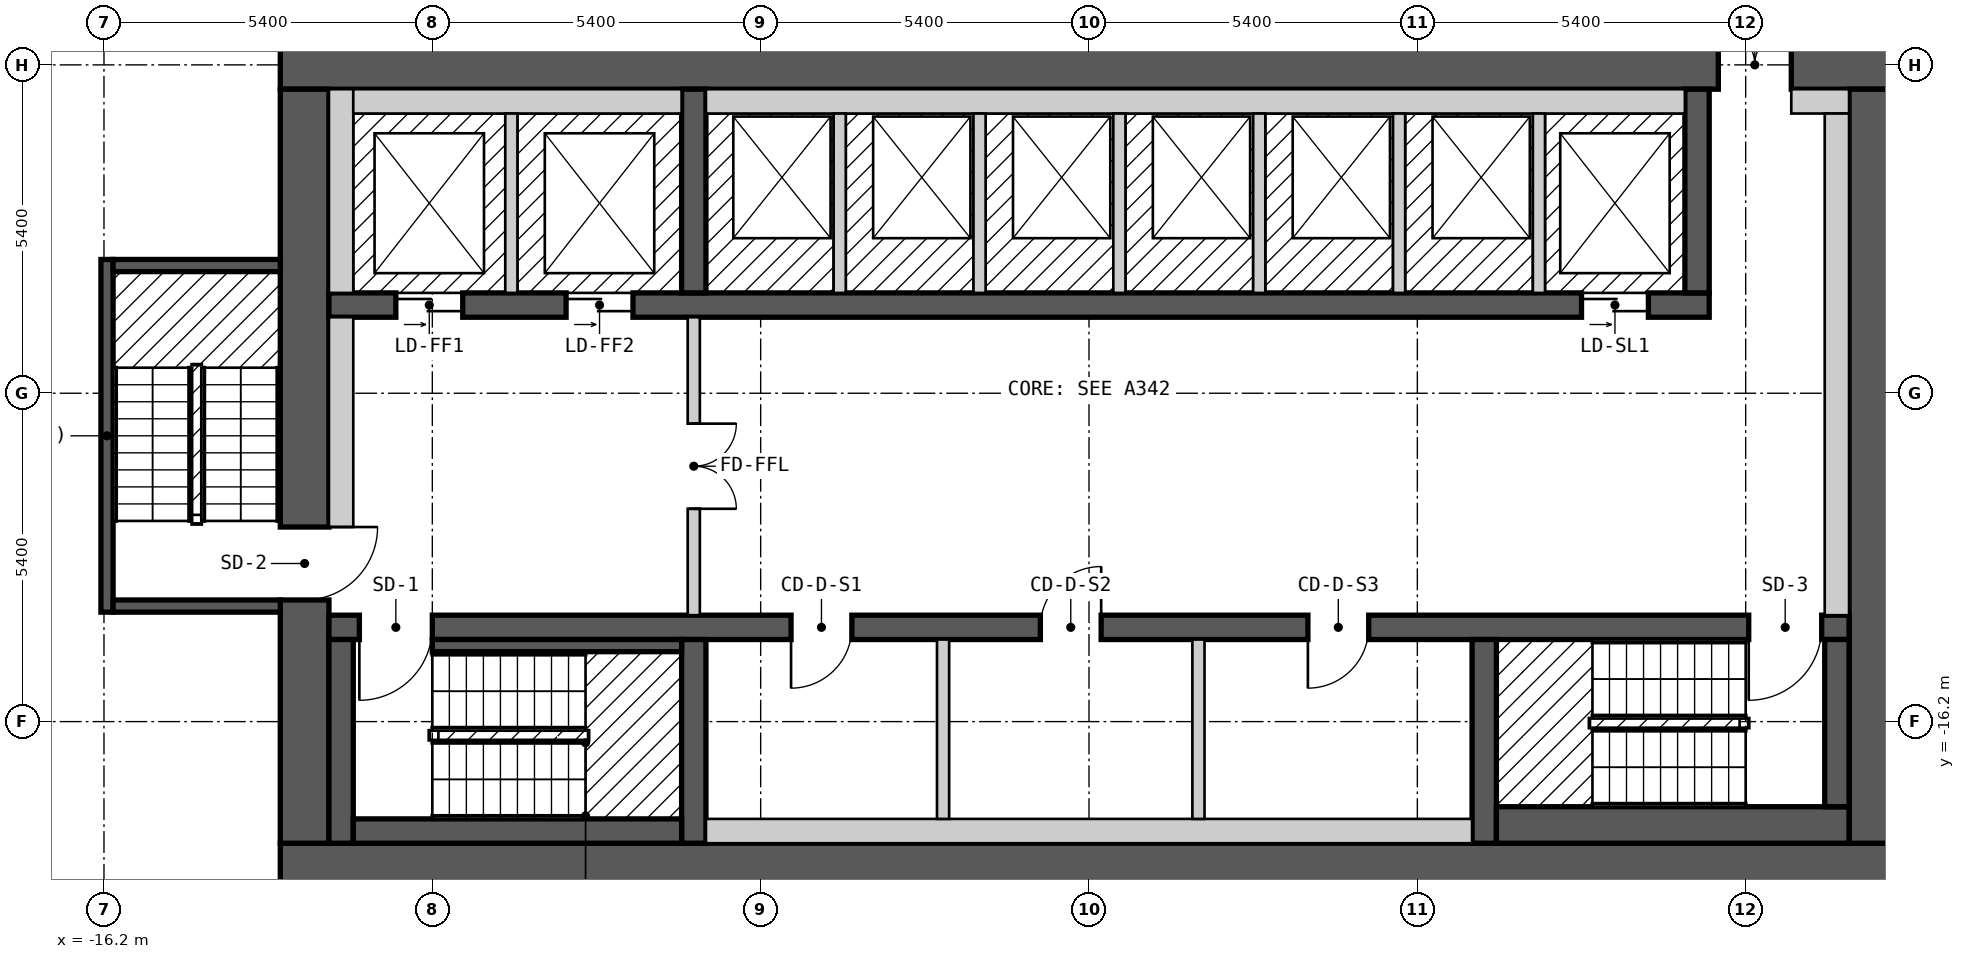
"""IFC4 building model, lengths in metres.
Left out: names, types, materials, properties, quantities, classifications, styles, units other than length and angle.
Written with IfcOpenShell. Run it as: python <this file> out.ifc"""

import sys

from ifc_helpers import new_model, si_unit, direction, frame, frame_2d, origin, place, context, subcontext, project, spatial, polyline, rectangle, outline, extrude, element, fill, save


model = new_model("IFC4")
c1 = context("Model", 3, precision=1e-05, world=origin(), true_north=direction((0.0, 1.0)))
c2 = subcontext(c1, "Body", "Model", "MODEL_VIEW")
j1 = project(units=[si_unit("LENGTHUNIT", "METRE"), si_unit("PLANEANGLEUNIT", "RADIAN")], contexts=[c1])
p1 = place(None, origin())
s1 = spatial("IfcSite", under=j1, at=p1, CompositionType="ELEMENT")
p2 = place(p1, origin())
s2 = spatial("IfcBuilding", under=s1, at=p2, CompositionType="ELEMENT")
p3 = place(p2, frame((0.0, 0.0, 153.6)))
s3 = spatial("IfcBuildingStorey", under=s2, at=p3, CompositionType="ELEMENT", Elevation=153.6)
p4 = place(p3, frame((-13.3, -18.6, 0.0), z_axis=(0.0, 0.0, 1.0), x_axis=(1.0, 0.0, 0.0)))
e1 = element("IfcWall", 1, at=p4, inside=s3, PredefinedType="SHEAR", context=c2, shape_type="SweptSolid", body=[
    extrude(rectangle(XDim=26.6, YDim=0.8, at=frame_2d((13.3, 0.0))), origin(), (0.0, 0.0, 1.0), 2.6),
])
p5 = place(p3, frame((-13.3, -5.4, 0.0), z_axis=(0.0, 0.0, 1.0), x_axis=(1.0, 0.0, 0.0)))
e2 = element("IfcWall", 2, at=p5, inside=s3, PredefinedType="SHEAR", context=c2, shape_type="SweptSolid", body=[
    extrude(rectangle(XDim=26.6, YDim=0.8, at=frame_2d((13.3, 0.0))), origin(), (0.0, 0.0, 1.0), 2.6),
])
p6 = place(p5, frame((23.65, 0.0, 0.0)))
e3 = element("IfcOpeningElement", 3, at=p6, cuts=e2, PredefinedType="OPENING", context=c2, shape_type="SweptSolid", body=[
    extrude(rectangle(XDim=1.2, YDim=2.1, at=frame_2d((0.6, 1.05))), frame((0.0, 0.41, 0.0), z_axis=(0.0, -1.0, 0.0), x_axis=(1.0, 0.0, 0.0)), (0.0, 0.0, 1.0), 0.82),
])
p7 = place(p3, frame((-12.9, -18.2, 0.0), z_axis=(0.0, 0.0, 1.0), x_axis=(0.0, 1.0, 0.0)))
e4 = element("IfcWall", 4, at=p7, inside=s3, PredefinedType="SHEAR", context=c2, shape_type="SweptSolid", body=[
    extrude(rectangle(XDim=12.4, YDim=0.8, at=frame_2d((6.2, 0.0))), origin(), (0.0, 0.0, 1.0), 2.6),
])
p8 = place(p7, frame((4.0, 0.0, 0.0)))
e5 = element("IfcOpeningElement", 5, at=p8, cuts=e4, PredefinedType="OPENING", context=c2, shape_type="SweptSolid", body=[
    extrude(rectangle(XDim=1.2, YDim=2.1, at=frame_2d((0.6, 1.05))), frame((0.0, 0.41, 0.0), z_axis=(0.0, -1.0, 0.0), x_axis=(1.0, 0.0, 0.0)), (0.0, 0.0, 1.0), 0.82),
])
p9 = place(p3, frame((12.9, -18.2, 0.0), z_axis=(0.0, 0.0, 1.0), x_axis=(0.0, 1.0, 0.0)))
e6 = element("IfcWall", 6, at=p9, inside=s3, PredefinedType="SHEAR", context=c2, shape_type="SweptSolid", body=[
    extrude(rectangle(XDim=12.4, YDim=0.8, at=frame_2d((6.2, 0.0))), origin(), (0.0, 0.0, 1.0), 2.6),
])
p10 = place(p3, frame((-12.5, -14.65, 0.0), z_axis=(0.0, 0.0, 1.0), x_axis=(1.0, 0.0, 0.0)))
e7 = element("IfcWall", 7, at=p10, inside=s3, PredefinedType="SHEAR", context=c2, shape_type="SweptSolid", body=[
    extrude(rectangle(XDim=25.0, YDim=0.4, at=frame_2d((12.5, 0.0))), origin(), (0.0, 0.0, 1.0), 2.6),
])
p11 = place(p10, frame((1.7, 0.0, 0.0), z_axis=(0.0, 0.0, 1.0), x_axis=(-1.0, 0.0, 0.0)))
e8 = element("IfcOpeningElement", 8, at=p11, cuts=e7, PredefinedType="OPENING", context=c2, shape_type="SweptSolid", body=[
    extrude(rectangle(XDim=1.2, YDim=2.1, at=frame_2d((0.6, 1.05))), frame((0.0, 0.21, 0.0), z_axis=(0.0, -1.0, 0.0), x_axis=(1.0, 0.0, 0.0)), (0.0, 0.0, 1.0), 0.42),
])
p12 = place(p10, frame((24.55, 0.0, 0.0), z_axis=(0.0, 0.0, 1.0), x_axis=(-1.0, 0.0, 0.0)))
e9 = element("IfcOpeningElement", 9, at=p12, cuts=e7, PredefinedType="OPENING", context=c2, shape_type="SweptSolid", body=[
    extrude(rectangle(XDim=1.2, YDim=2.1, at=frame_2d((0.6, 1.05))), frame((0.0, 0.21, 0.0), z_axis=(0.0, -1.0, 0.0), x_axis=(1.0, 0.0, 0.0)), (0.0, 0.0, 1.0), 0.42),
])
p13 = place(p10, frame((8.6, 0.0, 0.0), z_axis=(0.0, 0.0, 1.0), x_axis=(-1.0, 0.0, 0.0)))
e10 = element("IfcOpeningElement", 10, at=p13, cuts=e7, PredefinedType="OPENING", context=c2, shape_type="SweptSolid", body=[
    extrude(rectangle(XDim=1.0, YDim=2.1, at=frame_2d((0.5, 1.05))), frame((0.0, 0.21, 0.0), z_axis=(0.0, -1.0, 0.0), x_axis=(1.0, 0.0, 0.0)), (0.0, 0.0, 1.0), 0.42),
])
p14 = place(p10, frame((12.7, 0.0, 0.0), z_axis=(0.0, 0.0, 1.0), x_axis=(-1.0, 0.0, 0.0)))
e11 = element("IfcOpeningElement", 11, at=p14, cuts=e7, PredefinedType="OPENING", context=c2, shape_type="SweptSolid", body=[
    extrude(rectangle(XDim=1.0, YDim=2.1, at=frame_2d((0.5, 1.05))), frame((0.0, 0.21, 0.0), z_axis=(0.0, -1.0, 0.0), x_axis=(1.0, 0.0, 0.0)), (0.0, 0.0, 1.0), 0.42),
])
p15 = place(p10, frame((17.1, 0.0, 0.0), z_axis=(0.0, 0.0, 1.0), x_axis=(-1.0, 0.0, 0.0)))
e12 = element("IfcOpeningElement", 12, at=p15, cuts=e7, PredefinedType="OPENING", context=c2, shape_type="SweptSolid", body=[
    extrude(rectangle(XDim=1.0, YDim=2.1, at=frame_2d((0.5, 1.05))), frame((0.0, 0.21, 0.0), z_axis=(0.0, -1.0, 0.0), x_axis=(1.0, 0.0, 0.0)), (0.0, 0.0, 1.0), 0.42),
])
p16 = place(p3, frame((-12.5, -9.35, 0.0), z_axis=(0.0, 0.0, 1.0), x_axis=(1.0, 0.0, 0.0)))
e13 = element("IfcWall", 13, at=p16, inside=s3, PredefinedType="SHEAR", context=c2, shape_type="SweptSolid", body=[
    extrude(rectangle(XDim=22.7, YDim=0.4, at=frame_2d((11.35, 0.0))), origin(), (0.0, 0.0, 1.0), 2.6),
])
p17 = place(p16, frame((1.1, 0.0, 0.0)))
e14 = element("IfcOpeningElement", 14, at=p17, cuts=e13, PredefinedType="OPENING", context=c2, shape_type="SweptSolid", body=[
    extrude(rectangle(XDim=1.1, YDim=2.1, at=frame_2d((0.55, 1.05))), frame((0.0, 0.21, 0.0), z_axis=(0.0, -1.0, 0.0), x_axis=(1.0, 0.0, 0.0)), (0.0, 0.0, 1.0), 0.42),
])
p18 = place(p16, frame((3.9, 0.0, 0.0)))
e15 = element("IfcOpeningElement", 15, at=p18, cuts=e13, PredefinedType="OPENING", context=c2, shape_type="SweptSolid", body=[
    extrude(rectangle(XDim=1.1, YDim=2.1, at=frame_2d((0.55, 1.05))), frame((0.0, 0.21, 0.0), z_axis=(0.0, -1.0, 0.0), x_axis=(1.0, 0.0, 0.0)), (0.0, 0.0, 1.0), 0.42),
])
p19 = place(p16, frame((20.6, 0.0, 0.0)))
e16 = element("IfcOpeningElement", 16, at=p19, cuts=e13, PredefinedType="OPENING", context=c2, shape_type="SweptSolid", body=[
    extrude(rectangle(XDim=1.1, YDim=2.1, at=frame_2d((0.55, 1.05))), frame((0.0, 0.21, 0.0), z_axis=(0.0, -1.0, 0.0), x_axis=(1.0, 0.0, 0.0)), (0.0, 0.0, 1.0), 0.42),
])
for number, where, z_axis, x_axis in (
    (17, (-6.5, -18.2, 0.0), (0.0, 0.0, 1.0), (0.0, 1.0, 0.0)),
    (18, (6.5, -18.2, 0.0), (0.0, 0.0, 1.0), (0.0, 1.0, 0.0)),
    (19, (-6.5, -9.15, 0.0), (0.0, 0.0, 1.0), (0.0, 1.0, 0.0)),
    (20, (10.0, -9.15, 0.0), (0.0, 0.0, 1.0), (0.0, 1.0, 0.0)),
):
    element("IfcWall", number, at=place(p3, frame(where, z_axis=z_axis, x_axis=x_axis)), inside=s3, PredefinedType="SHEAR", context=c2, shape_type="SweptSolid", body=[
        extrude(rectangle(XDim=3.35, YDim=0.4, at=frame_2d((1.675, 0.0))), origin(), (0.0, 0.0, 1.0), 2.6),
    ])
p20 = place(p3, frame((-28.218, -2.025, 0.0), z_axis=(0.0, 0.0, 1.0), x_axis=(0.500017503135, -0.866015298109, 0.0)))
e21 = element("IfcWall", 21, at=p20, inside=s3, PredefinedType="SOLIDWALL", context=c2, shape_type="SweptSolid", body=[
    extrude(outline(polyline([(0.0, -0.15), (24.711, -0.15), (24.631, 0.15), (0.08, 0.15), (0.0, -0.15)])), origin(), (0.0, 0.0, 1.0), 2.6),
])
p21 = place(p3, frame((-16.15, -14.4, 0.0), z_axis=(0.0, 0.0, 1.0), x_axis=(0.0, 1.0, 0.0)))
e22 = element("IfcWall", 22, at=p21, inside=s3, PredefinedType="SOLIDWALL", context=c2, shape_type="SweptSolid", body=[
    extrude(rectangle(XDim=5.8, YDim=0.2, at=frame_2d((2.9, 0.0))), origin(), (0.0, 0.0, 1.0), 2.6),
])
for number, where, z_axis, x_axis in (
    (23, (-16.05, -14.3, 0.0), (0.0, 0.0, 1.0), (1.0, 0.0, 0.0)),
    (24, (-16.05, -8.7, 0.0), (0.0, 0.0, 1.0), (1.0, 0.0, 0.0)),
):
    element("IfcWall", number, at=place(p3, frame(where, z_axis=z_axis, x_axis=x_axis)), inside=s3, PredefinedType="SOLIDWALL", context=c2, shape_type="SweptSolid", body=[
        extrude(rectangle(XDim=2.75, YDim=0.2, at=frame_2d((1.375, 0.0))), origin(), (0.0, 0.0, 1.0), 2.6),
    ])
p22 = place(p3, frame((-12.3, -18.2, 0.0), z_axis=(0.0, 0.0, 1.0), x_axis=(0.0, 1.0, 0.0)))
e25 = element("IfcWall", 25, at=p22, inside=s3, PredefinedType="SOLIDWALL", context=c2, shape_type="SweptSolid", body=[
    extrude(rectangle(XDim=3.35, YDim=0.4, at=frame_2d((1.675, 0.0))), origin(), (0.0, 0.0, 1.0), 2.6),
])
p23 = place(p3, frame((-12.3, -13.0, 0.0), z_axis=(0.0, 0.0, 1.0), x_axis=(0.0, 1.0, 0.0)))
e26 = element("IfcWall", 26, at=p23, inside=s3, PredefinedType="PARTITIONING", context=c2, shape_type="SweptSolid", body=[
    extrude(rectangle(XDim=3.45, YDim=0.4, at=frame_2d((1.725, 0.0))), origin(), (0.0, 0.0, 1.0), 2.6),
])
p24 = place(p3, frame((-12.3, -9.15, 0.0), z_axis=(0.0, 0.0, 1.0), x_axis=(0.0, 1.0, 0.0)))
e27 = element("IfcWall", 27, at=p24, inside=s3, PredefinedType="SOLIDWALL", context=c2, shape_type="SweptSolid", body=[
    extrude(rectangle(XDim=3.35, YDim=0.4, at=frame_2d((1.675, 0.0))), origin(), (0.0, 0.0, 1.0), 2.6),
])
for number, where, z_axis, x_axis in (
    (28, (-12.1, -18.0, 0.0), (0.0, 0.0, 1.0), (1.0, 0.0, 0.0)),
    (29, (-12.1, -6.0, 0.0), (0.0, 0.0, 1.0), (1.0, 0.0, 0.0)),
):
    element("IfcWall", number, at=place(p3, frame(where, z_axis=z_axis, x_axis=x_axis)), inside=s3, PredefinedType="SOLIDWALL", context=c2, shape_type="SweptSolid", body=[
        extrude(rectangle(XDim=5.4, YDim=0.4, at=frame_2d((2.7, 0.0))), origin(), (0.0, 0.0, 1.0), 2.6),
    ])
p25 = place(p3, frame((-10.8, -14.95, 0.0), z_axis=(0.0, 0.0, 1.0), x_axis=(1.0, 0.0, 0.0)))
e30 = element("IfcWall", 30, at=p25, inside=s3, PredefinedType="SOLIDWALL", context=c2, shape_type="SweptSolid", body=[
    extrude(rectangle(XDim=4.1, YDim=0.2, at=frame_2d((2.05, 0.0))), origin(), (0.0, 0.0, 1.0), 2.6),
])
p26 = place(p3, frame((-9.5, -9.15, 0.0), z_axis=(0.0, 0.0, 1.0), x_axis=(0.0, 1.0, 0.0)))
e31 = element("IfcWall", 31, at=p26, inside=s3, PredefinedType="SOLIDWALL", context=c2, shape_type="SweptSolid", body=[
    extrude(rectangle(XDim=2.95, YDim=0.2, at=frame_2d((1.475, 0.0))), origin(), (0.0, 0.0, 1.0), 2.6),
])
p27 = place(p3, frame((-6.5, -14.45, 0.0), z_axis=(0.0, 0.0, 1.0), x_axis=(0.0, 1.0, 0.0)))
e32 = element("IfcWall", 32, at=p27, inside=s3, PredefinedType="PARTITIONING", context=c2, shape_type="SweptSolid", body=[
    extrude(rectangle(XDim=4.9, YDim=0.2, at=frame_2d((2.45, 0.0))), origin(), (0.0, 0.0, 1.0), 2.6),
])
p28 = place(p27, frame((3.15, 0.0, 0.0), z_axis=(0.0, 0.0, 1.0), x_axis=(-1.0, 0.0, 0.0)))
e33 = element("IfcOpeningElement", 33, at=p28, cuts=e32, PredefinedType="OPENING", context=c2, shape_type="SweptSolid", body=[
    extrude(rectangle(XDim=1.4, YDim=2.1, at=frame_2d((0.7, 1.05))), frame((0.0, 0.11, 0.0), z_axis=(0.0, -1.0, 0.0), x_axis=(1.0, 0.0, 0.0)), (0.0, 0.0, 1.0), 0.22),
])
p29 = place(p3, frame((-6.3, -18.0, 0.0), z_axis=(0.0, 0.0, 1.0), x_axis=(1.0, 0.0, 0.0)))
e34 = element("IfcWall", 34, at=p29, inside=s3, PredefinedType="PARTITIONING", context=c2, shape_type="SweptSolid", body=[
    extrude(rectangle(XDim=12.6, YDim=0.4, at=frame_2d((6.3, 0.0))), origin(), (0.0, 0.0, 1.0), 2.6),
])
p30 = place(p3, frame((-6.3, -6.0, 0.0), z_axis=(0.0, 0.0, 1.0), x_axis=(1.0, 0.0, 0.0)))
e35 = element("IfcWall", 35, at=p30, inside=s3, PredefinedType="SOLIDWALL", context=c2, shape_type="SweptSolid", body=[
    extrude(rectangle(XDim=16.1, YDim=0.4, at=frame_2d((8.05, 0.0))), origin(), (0.0, 0.0, 1.0), 2.6),
])
p31 = place(p3, frame((-4.1, -9.15, 0.0), z_axis=(0.0, 0.0, 1.0), x_axis=(0.0, 1.0, 0.0)))
e36 = element("IfcWall", 36, at=p31, inside=s3, PredefinedType="SOLIDWALL", context=c2, shape_type="SweptSolid", body=[
    extrude(rectangle(XDim=2.95, YDim=0.2, at=frame_2d((1.475, 0.0))), origin(), (0.0, 0.0, 1.0), 2.6),
])
p32 = place(p3, frame((-2.4, -17.8, 0.0), z_axis=(0.0, 0.0, 1.0), x_axis=(0.0, 1.0, 0.0)))
e37 = element("IfcWall", 37, at=p32, inside=s3, PredefinedType="PARTITIONING", context=c2, shape_type="SweptSolid", body=[
    extrude(rectangle(XDim=2.95, YDim=0.2, at=frame_2d((1.475, 0.0))), origin(), (0.0, 0.0, 1.0), 2.6),
])
for number, where, z_axis, x_axis in (
    (38, (-1.8, -9.15, 0.0), (0.0, 0.0, 1.0), (0.0, 1.0, 0.0)),
    (39, (0.5, -9.15, 0.0), (0.0, 0.0, 1.0), (0.0, 1.0, 0.0)),
):
    element("IfcWall", number, at=place(p3, frame(where, z_axis=z_axis, x_axis=x_axis)), inside=s3, PredefinedType="SOLIDWALL", context=c2, shape_type="SweptSolid", body=[
        extrude(rectangle(XDim=2.95, YDim=0.2, at=frame_2d((1.475, 0.0))), origin(), (0.0, 0.0, 1.0), 2.6),
    ])
p33 = place(p3, frame((1.8, -17.8, 0.0), z_axis=(0.0, 0.0, 1.0), x_axis=(0.0, 1.0, 0.0)))
e40 = element("IfcWall", 40, at=p33, inside=s3, PredefinedType="PARTITIONING", context=c2, shape_type="SweptSolid", body=[
    extrude(rectangle(XDim=2.95, YDim=0.2, at=frame_2d((1.475, 0.0))), origin(), (0.0, 0.0, 1.0), 2.6),
])
for number, where, z_axis, x_axis in (
    (41, (2.8, -9.15, 0.0), (0.0, 0.0, 1.0), (0.0, 1.0, 0.0)),
    (42, (5.1, -9.15, 0.0), (0.0, 0.0, 1.0), (0.0, 1.0, 0.0)),
):
    element("IfcWall", number, at=place(p3, frame(where, z_axis=z_axis, x_axis=x_axis)), inside=s3, PredefinedType="SOLIDWALL", context=c2, shape_type="SweptSolid", body=[
        extrude(rectangle(XDim=2.95, YDim=0.2, at=frame_2d((1.475, 0.0))), origin(), (0.0, 0.0, 1.0), 2.6),
    ])
p34 = place(p3, frame((6.7, -17.9, 0.0), z_axis=(0.0, 0.0, 1.0), x_axis=(1.0, 0.0, 0.0)))
e43 = element("IfcWall", 43, at=p34, inside=s3, PredefinedType="SOLIDWALL", context=c2, shape_type="SweptSolid", body=[
    extrude(rectangle(XDim=5.8, YDim=0.6, at=frame_2d((2.9, 0.0))), origin(), (0.0, 0.0, 1.0), 2.6),
])
p35 = place(p3, frame((7.4, -9.15, 0.0), z_axis=(0.0, 0.0, 1.0), x_axis=(0.0, 1.0, 0.0)))
e44 = element("IfcWall", 44, at=p35, inside=s3, PredefinedType="SOLIDWALL", context=c2, shape_type="SweptSolid", body=[
    extrude(rectangle(XDim=2.95, YDim=0.2, at=frame_2d((1.475, 0.0))), origin(), (0.0, 0.0, 1.0), 2.6),
])
p36 = place(p3, frame((11.55, -6.0, 0.0), z_axis=(0.0, 0.0, 1.0), x_axis=(1.0, 0.0, 0.0)))
e45 = element("IfcWall", 45, at=p36, inside=s3, PredefinedType="PARTITIONING", context=c2, shape_type="SweptSolid", body=[
    extrude(rectangle(XDim=0.95, YDim=0.4, at=frame_2d((0.475, 0.0))), origin(), (0.0, 0.0, 1.0), 2.6),
])
p37 = place(p3, frame((12.3, -17.6, 0.0), z_axis=(0.0, 0.0, 1.0), x_axis=(0.0, 1.0, 0.0)))
e46 = element("IfcWall", 46, at=p37, inside=s3, PredefinedType="SOLIDWALL", context=c2, shape_type="SweptSolid", body=[
    extrude(rectangle(XDim=2.75, YDim=0.4, at=frame_2d((1.375, 0.0))), origin(), (0.0, 0.0, 1.0), 2.6),
])
p38 = place(p3, frame((12.3, -14.45, 0.0), z_axis=(0.0, 0.0, 1.0), x_axis=(0.0, 1.0, 0.0)))
e47 = element("IfcWall", 47, at=p38, inside=s3, PredefinedType="PARTITIONING", context=c2, shape_type="SweptSolid", body=[
    extrude(rectangle(XDim=8.25, YDim=0.4, at=frame_2d((4.125, 0.0))), origin(), (0.0, 0.0, 1.0), 2.6),
])
p39 = place(p17, origin())
e48 = element("IfcDoor", 48, at=p39, inside=s3, OperationType="DOUBLE_DOOR_SLIDING", PredefinedType="DOOR", context=c2, shape_type="SweptSolid", body=[
    extrude(rectangle(XDim=1.1, YDim=2.1, at=frame_2d((0.55, 1.05))), frame((0.0, 0.025, 0.0), z_axis=(0.0, -1.0, 0.0), x_axis=(1.0, 0.0, 0.0)), (0.0, 0.0, 1.0), 0.05),
])
fill(e14, e48)
p40 = place(p18, origin())
e49 = element("IfcDoor", 49, at=p40, inside=s3, OperationType="DOUBLE_DOOR_SLIDING", PredefinedType="DOOR", context=c2, shape_type="SweptSolid", body=[
    extrude(rectangle(XDim=1.1, YDim=2.1, at=frame_2d((0.55, 1.05))), frame((0.0, 0.025, 0.0), z_axis=(0.0, -1.0, 0.0), x_axis=(1.0, 0.0, 0.0)), (0.0, 0.0, 1.0), 0.05),
])
fill(e15, e49)
p41 = place(p19, origin())
e50 = element("IfcDoor", 50, at=p41, inside=s3, OperationType="DOUBLE_DOOR_SLIDING", PredefinedType="DOOR", context=c2, shape_type="SweptSolid", body=[
    extrude(rectangle(XDim=1.1, YDim=2.1, at=frame_2d((0.55, 1.05))), frame((0.0, 0.025, 0.0), z_axis=(0.0, -1.0, 0.0), x_axis=(1.0, 0.0, 0.0)), (0.0, 0.0, 1.0), 0.05),
])
fill(e16, e50)
p42 = place(p11, origin())
e51 = element("IfcDoor", 51, at=p42, inside=s3, OperationType="SINGLE_SWING_RIGHT", PredefinedType="DOOR", context=c2, shape_type="SweptSolid", body=[
    extrude(rectangle(XDim=1.2, YDim=2.1, at=frame_2d((0.6, 1.05))), frame((0.0, 0.025, 0.0), z_axis=(0.0, -1.0, 0.0), x_axis=(1.0, 0.0, 0.0)), (0.0, 0.0, 1.0), 0.05),
])
fill(e8, e51)
p43 = place(p12, origin())
e52 = element("IfcDoor", 52, at=p43, inside=s3, OperationType="SINGLE_SWING_RIGHT", PredefinedType="DOOR", context=c2, shape_type="SweptSolid", body=[
    extrude(rectangle(XDim=1.2, YDim=2.1, at=frame_2d((0.6, 1.05))), frame((0.0, 0.025, 0.0), z_axis=(0.0, -1.0, 0.0), x_axis=(1.0, 0.0, 0.0)), (0.0, 0.0, 1.0), 0.05),
])
fill(e9, e52)
p44 = place(p8, origin())
e53 = element("IfcDoor", 53, at=p44, inside=s3, OperationType="SINGLE_SWING_RIGHT", PredefinedType="DOOR", context=c2, shape_type="SweptSolid", body=[
    extrude(rectangle(XDim=1.2, YDim=2.1, at=frame_2d((0.6, 1.05))), frame((0.0, 0.025, 0.0), z_axis=(0.0, -1.0, 0.0), x_axis=(1.0, 0.0, 0.0)), (0.0, 0.0, 1.0), 0.05),
])
fill(e5, e53)
p45 = place(p28, origin())
e54 = element("IfcDoor", 54, at=p45, inside=s3, OperationType="DOUBLE_DOOR_SINGLE_SWING", PredefinedType="DOOR", context=c2, shape_type="SweptSolid", body=[
    extrude(rectangle(XDim=1.4, YDim=2.1, at=frame_2d((0.7, 1.05))), frame((0.0, 0.025, 0.0), z_axis=(0.0, -1.0, 0.0), x_axis=(1.0, 0.0, 0.0)), (0.0, 0.0, 1.0), 0.05),
])
fill(e33, e54)
p46 = place(p6, origin())
e55 = element("IfcDoor", 55, at=p46, inside=s3, OperationType="DOUBLE_DOOR_SINGLE_SWING", PredefinedType="DOOR", context=c2, shape_type="SweptSolid", body=[
    extrude(rectangle(XDim=1.2, YDim=2.1, at=frame_2d((0.6, 1.05))), frame((0.0, 0.025, 0.0), z_axis=(0.0, -1.0, 0.0), x_axis=(1.0, 0.0, 0.0)), (0.0, 0.0, 1.0), 0.05),
])
fill(e3, e55)
p47 = place(p13, origin())
e56 = element("IfcDoor", 56, at=p47, inside=s3, OperationType="SINGLE_SWING_RIGHT", PredefinedType="DOOR", context=c2, shape_type="SweptSolid", body=[
    extrude(rectangle(XDim=1.0, YDim=2.1, at=frame_2d((0.5, 1.05))), frame((0.0, 0.025, 0.0), z_axis=(0.0, -1.0, 0.0), x_axis=(1.0, 0.0, 0.0)), (0.0, 0.0, 1.0), 0.05),
])
fill(e10, e56)
p48 = place(p14, origin())
e57 = element("IfcDoor", 57, at=p48, inside=s3, OperationType="SINGLE_SWING_LEFT", PredefinedType="DOOR", context=c2, shape_type="SweptSolid", body=[
    extrude(rectangle(XDim=1.0, YDim=2.1, at=frame_2d((0.5, 1.05))), frame((0.0, 0.025, 0.0), z_axis=(0.0, -1.0, 0.0), x_axis=(1.0, 0.0, 0.0)), (0.0, 0.0, 1.0), 0.05),
])
fill(e11, e57)
p49 = place(p15, origin())
e58 = element("IfcDoor", 58, at=p49, inside=s3, OperationType="SINGLE_SWING_RIGHT", PredefinedType="DOOR", context=c2, shape_type="SweptSolid", body=[
    extrude(rectangle(XDim=1.0, YDim=2.1, at=frame_2d((0.5, 1.05))), frame((0.0, 0.025, 0.0), z_axis=(0.0, -1.0, 0.0), x_axis=(1.0, 0.0, 0.0)), (0.0, 0.0, 1.0), 0.05),
])
fill(e12, e58)
save(model, sys.argv[1])
